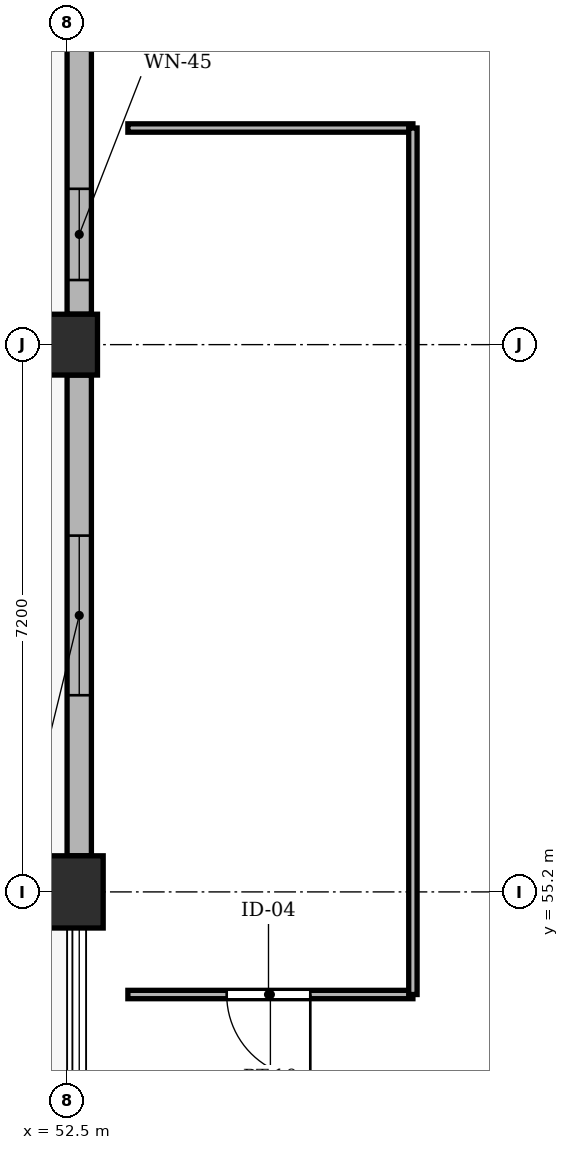
"""IFC4 building model, lengths in metres.
Left out: names, types, materials, properties, quantities, classifications, styles, units other than length and angle.
Written with IfcOpenShell. Run it as: python <this file> out.ifc"""

import sys

from ifc_helpers import new_model, si_unit, direction, frame, frame_2d, origin, origin_2d, place, context, subcontext, project, spatial, rectangle, extrude, element, fill, save


model = new_model("IFC4")
c1 = context("Model", 3, precision=1e-05, world=origin(), true_north=direction((0.0, 1.0)))
c2 = subcontext(c1, "Body", "Model", "MODEL_VIEW")
j1 = project(units=[si_unit("LENGTHUNIT", "METRE"), si_unit("PLANEANGLEUNIT", "RADIAN")], contexts=[c1])
p1 = place(None, origin())
s1 = spatial("IfcSite", under=j1, at=p1, CompositionType="ELEMENT")
p2 = place(p1, origin())
s2 = spatial("IfcBuilding", under=s1, at=p2, CompositionType="ELEMENT")
p3 = place(p2, frame((0.0, 0.0, 40.55)))
s3 = spatial("IfcBuildingStorey", under=s2, at=p3, CompositionType="ELEMENT", Elevation=40.55)
p4 = place(p3, frame((52.5, 55.2, -0.24), z_axis=(0.0, 0.0, 1.0), x_axis=(1.0, 0.0, 0.0)))
e1 = element("IfcColumn", 1, at=p4, inside=s3, PredefinedType="COLUMN", context=c2, shape_type="SweptSolid", body=[
    extrude(rectangle(XDim=0.95, YDim=0.95, at=origin_2d()), origin(), (0.0, 0.0, 1.0), 3.25),
])
p5 = place(p3, frame((52.5, 62.4, -0.24), z_axis=(0.0, 0.0, 1.0), x_axis=(1.0, 0.0, 0.0)))
e2 = element("IfcColumn", 2, at=p5, inside=s3, PredefinedType="COLUMN", context=c2, shape_type="SweptSolid", body=[
    extrude(rectangle(XDim=0.8, YDim=0.8, at=origin_2d()), origin(), (0.0, 0.0, 1.0), 3.25),
])
p6 = place(p3, frame((52.66, 68.4, 0.0), z_axis=(0.0, 0.0, 1.0), x_axis=(0.0, -1.0, 0.0)))
e3 = element("IfcWall", 3, at=p6, inside=s3, PredefinedType="SOLIDWALL", context=c2, shape_type="SweptSolid", body=[
    extrude(rectangle(XDim=5.6, YDim=0.32, at=frame_2d((2.8, 0.0))), origin(), (0.0, 0.0, 1.0), 2.53),
])
p7 = place(p6, frame((3.95, 0.0, 0.62)))
e4 = element("IfcOpeningElement", 4, at=p7, cuts=e3, PredefinedType="OPENING", context=c2, shape_type="SweptSolid", body=[
    extrude(rectangle(XDim=1.2, YDim=1.65, at=frame_2d((0.6, 0.825))), frame((0.0, 0.172, 0.0), z_axis=(0.0, -1.0, 0.0), x_axis=(1.0, 0.0, 0.0)), (0.0, 0.0, 1.0), 0.344),
])
p8 = place(p3, frame((52.66, 62.0, 0.0), z_axis=(0.0, 0.0, 1.0), x_axis=(0.0, -1.0, 0.0)))
e5 = element("IfcWall", 5, at=p8, inside=s3, PredefinedType="SOLIDWALL", context=c2, shape_type="SweptSolid", body=[
    extrude(rectangle(XDim=6.325, YDim=0.32, at=frame_2d((3.163, 0.0))), origin(), (0.0, 0.0, 1.0), 2.53),
])
p9 = place(p8, frame((2.113, 0.0, 0.62)))
e6 = element("IfcOpeningElement", 6, at=p9, cuts=e5, PredefinedType="OPENING", context=c2, shape_type="SweptSolid", body=[
    extrude(rectangle(XDim=2.1, YDim=1.81, at=frame_2d((1.05, 0.905))), frame((0.0, 0.172, 0.0), z_axis=(0.0, -1.0, 0.0), x_axis=(1.0, 0.0, 0.0)), (0.0, 0.0, 1.0), 0.344),
])
p10 = place(p3, frame((53.3, 53.85, 0.0), z_axis=(0.0, 0.0, 1.0), x_axis=(1.0, 0.0, 0.0)))
e7 = element("IfcWall", 7, at=p10, inside=s3, PredefinedType="PARTITIONING", context=c2, shape_type="SweptSolid", body=[
    extrude(rectangle(XDim=3.75, YDim=0.11, at=frame_2d((1.875, 0.0))), origin(), (0.0, 0.0, 1.0), 2.53),
])
p11 = place(p10, frame((1.3, 0.0, 0.0)))
e8 = element("IfcOpeningElement", 8, at=p11, cuts=e7, PredefinedType="OPENING", context=c2, shape_type="SweptSolid", body=[
    extrude(rectangle(XDim=1.1, YDim=2.15, at=frame_2d((0.55, 1.075))), frame((0.0, 0.067, 0.0), z_axis=(0.0, -1.0, 0.0), x_axis=(1.0, 0.0, 0.0)), (0.0, 0.0, 1.0), 0.134),
])
p12 = place(p3, frame((53.3, 65.25, 0.0), z_axis=(0.0, 0.0, 1.0), x_axis=(1.0, 0.0, 0.0)))
e9 = element("IfcWall", 9, at=p12, inside=s3, PredefinedType="PARTITIONING", context=c2, shape_type="SweptSolid", body=[
    extrude(rectangle(XDim=3.75, YDim=0.11, at=frame_2d((1.875, 0.0))), origin(), (0.0, 0.0, 1.0), 2.53),
])
p13 = place(p3, frame((57.05, 53.85, 0.0), z_axis=(0.0, 0.0, 1.0), x_axis=(0.0, 1.0, 0.0)))
e10 = element("IfcWall", 10, at=p13, inside=s3, PredefinedType="PARTITIONING", context=c2, shape_type="SweptSolid", body=[
    extrude(rectangle(XDim=11.4, YDim=0.11, at=frame_2d((5.7, 0.0))), origin(), (0.0, 0.0, 1.0), 2.53),
])
p14 = place(p7, origin())
e11 = element("IfcWindow", 11, at=p14, inside=s3, PartitioningType="SINGLE_PANEL", PredefinedType="WINDOW", context=c2, shape_type="SweptSolid", body=[
    extrude(rectangle(XDim=1.2, YDim=1.65, at=frame_2d((0.6, 0.825))), frame((0.0, 0.03, 0.0), z_axis=(0.0, -1.0, 0.0), x_axis=(1.0, 0.0, 0.0)), (0.0, 0.0, 1.0), 0.06),
])
fill(e4, e11)
p15 = place(p9, origin())
e12 = element("IfcWindow", 12, at=p15, inside=s3, PartitioningType="SINGLE_PANEL", PredefinedType="WINDOW", context=c2, shape_type="SweptSolid", body=[
    extrude(rectangle(XDim=2.1, YDim=1.81, at=frame_2d((1.05, 0.905))), frame((0.0, 0.03, 0.0), z_axis=(0.0, -1.0, 0.0), x_axis=(1.0, 0.0, 0.0)), (0.0, 0.0, 1.0), 0.06),
])
fill(e6, e12)
p16 = place(p11, frame((1.1, 0.0, 0.0), z_axis=(0.0, 0.0, 1.0), x_axis=(-1.0, 0.0, 0.0)))
e13 = element("IfcDoor", 13, at=p16, inside=s3, OperationType="SINGLE_SWING_RIGHT", PredefinedType="DOOR", context=c2, shape_type="SweptSolid", body=[
    extrude(rectangle(XDim=1.1, YDim=2.15, at=frame_2d((0.55, 1.075))), frame((0.0, 0.025, 0.0), z_axis=(0.0, -1.0, 0.0), x_axis=(1.0, 0.0, 0.0)), (0.0, 0.0, 1.0), 0.05),
])
fill(e8, e13)
save(model, sys.argv[1])
